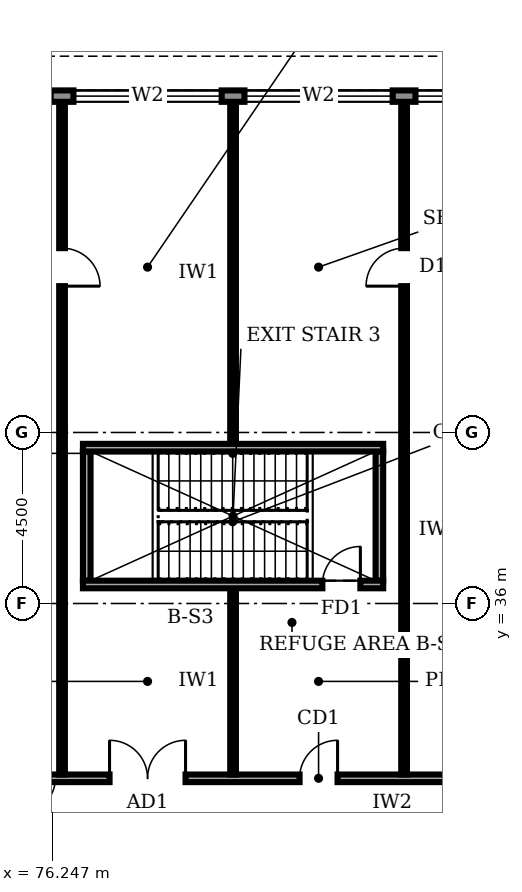
"""IFC4 building model, lengths in metres.
Left out: names, types, materials, properties, quantities, classifications, styles, units other than length and angle.
Written with IfcOpenShell. Run it as: python <this file> out.ifc"""

import sys

from ifc_helpers import new_model, si_unit, direction, frame, frame_2d, origin, place, context, subcontext, project, spatial, rectangle, extrude, element, fill, save


model = new_model("IFC4")
c1 = context("Model", 3, precision=1e-05, world=origin(), true_north=direction((0.0, 1.0)))
c2 = subcontext(c1, "Body", "Model", "MODEL_VIEW")
j1 = project(units=[si_unit("LENGTHUNIT", "METRE"), si_unit("PLANEANGLEUNIT", "RADIAN")], contexts=[c1])
p1 = place(None, origin())
s1 = spatial("IfcSite", under=j1, at=p1, CompositionType="ELEMENT")
p2 = place(p1, origin())
s2 = spatial("IfcBuilding", under=s1, at=p2, CompositionType="ELEMENT")
p3 = place(p2, frame((0.0, 0.0, 6.0)))
s3 = spatial("IfcBuildingStorey", under=s2, at=p3, CompositionType="ELEMENT", Elevation=6.0)
p4 = place(p3, frame((98.98, 49.35, 0.0), z_axis=(0.0, 0.0, 1.0), x_axis=(-1.0, 0.0, 0.0)))
e1 = element("IfcWall", 1, at=p4, inside=s3, PredefinedType="STANDARD", context=c2, shape_type="SweptSolid", body=[
    extrude(rectangle(XDim=98.96, YDim=0.3, at=frame_2d((49.48, 0.0))), origin(), (0.0, 0.0, 1.0), 4.7),
])
p5 = place(p4, frame((94.78, 0.0, 0.6)))
e2 = element("IfcOpeningElement", 2, at=p5, cuts=e1, PredefinedType="OPENING", context=c2, shape_type="SweptSolid", body=[
    extrude(rectangle(XDim=3.9, YDim=2.6, at=frame_2d((1.95, 1.3))), frame((0.0, 0.16, 0.0), z_axis=(0.0, -1.0, 0.0), x_axis=(1.0, 0.0, 0.0)), (0.0, 0.0, 1.0), 0.32),
])
p6 = place(p4, frame((90.28, 0.0, 0.6)))
e3 = element("IfcOpeningElement", 3, at=p6, cuts=e1, PredefinedType="OPENING", context=c2, shape_type="SweptSolid", body=[
    extrude(rectangle(XDim=3.9, YDim=2.6, at=frame_2d((1.95, 1.3))), frame((0.0, 0.16, 0.0), z_axis=(0.0, -1.0, 0.0), x_axis=(1.0, 0.0, 0.0)), (0.0, 0.0, 1.0), 0.32),
])
p7 = place(p4, frame((85.78, 0.0, 0.6)))
e4 = element("IfcOpeningElement", 4, at=p7, cuts=e1, PredefinedType="OPENING", context=c2, shape_type="SweptSolid", body=[
    extrude(rectangle(XDim=3.9, YDim=2.6, at=frame_2d((1.95, 1.3))), frame((0.0, 0.16, 0.0), z_axis=(0.0, -1.0, 0.0), x_axis=(1.0, 0.0, 0.0)), (0.0, 0.0, 1.0), 0.32),
])
p8 = place(p4, frame((81.28, 0.0, 0.6)))
e5 = element("IfcOpeningElement", 5, at=p8, cuts=e1, PredefinedType="OPENING", context=c2, shape_type="SweptSolid", body=[
    extrude(rectangle(XDim=3.9, YDim=2.6, at=frame_2d((1.95, 1.3))), frame((0.0, 0.16, 0.0), z_axis=(0.0, -1.0, 0.0), x_axis=(1.0, 0.0, 0.0)), (0.0, 0.0, 1.0), 0.32),
])
p9 = place(p4, frame((76.78, 0.0, 0.6)))
e6 = element("IfcOpeningElement", 6, at=p9, cuts=e1, PredefinedType="OPENING", context=c2, shape_type="SweptSolid", body=[
    extrude(rectangle(XDim=3.9, YDim=2.6, at=frame_2d((1.95, 1.3))), frame((0.0, 0.16, 0.0), z_axis=(0.0, -1.0, 0.0), x_axis=(1.0, 0.0, 0.0)), (0.0, 0.0, 1.0), 0.32),
])
p10 = place(p4, frame((72.28, 0.0, 0.6)))
e7 = element("IfcOpeningElement", 7, at=p10, cuts=e1, PredefinedType="OPENING", context=c2, shape_type="SweptSolid", body=[
    extrude(rectangle(XDim=3.9, YDim=2.6, at=frame_2d((1.95, 1.3))), frame((0.0, 0.16, 0.0), z_axis=(0.0, -1.0, 0.0), x_axis=(1.0, 0.0, 0.0)), (0.0, 0.0, 1.0), 0.32),
])
p11 = place(p4, frame((67.78, 0.0, 0.6)))
e8 = element("IfcOpeningElement", 8, at=p11, cuts=e1, PredefinedType="OPENING", context=c2, shape_type="SweptSolid", body=[
    extrude(rectangle(XDim=3.9, YDim=2.6, at=frame_2d((1.95, 1.3))), frame((0.0, 0.16, 0.0), z_axis=(0.0, -1.0, 0.0), x_axis=(1.0, 0.0, 0.0)), (0.0, 0.0, 1.0), 0.32),
])
p12 = place(p4, frame((63.28, 0.0, 0.6)))
e9 = element("IfcOpeningElement", 9, at=p12, cuts=e1, PredefinedType="OPENING", context=c2, shape_type="SweptSolid", body=[
    extrude(rectangle(XDim=3.9, YDim=2.6, at=frame_2d((1.95, 1.3))), frame((0.0, 0.16, 0.0), z_axis=(0.0, -1.0, 0.0), x_axis=(1.0, 0.0, 0.0)), (0.0, 0.0, 1.0), 0.32),
])
p13 = place(p4, frame((58.78, 0.0, 0.6)))
e10 = element("IfcOpeningElement", 10, at=p13, cuts=e1, PredefinedType="OPENING", context=c2, shape_type="SweptSolid", body=[
    extrude(rectangle(XDim=3.9, YDim=2.6, at=frame_2d((1.95, 1.3))), frame((0.0, 0.16, 0.0), z_axis=(0.0, -1.0, 0.0), x_axis=(1.0, 0.0, 0.0)), (0.0, 0.0, 1.0), 0.32),
])
p14 = place(p4, frame((54.28, 0.0, 0.6)))
e11 = element("IfcOpeningElement", 11, at=p14, cuts=e1, PredefinedType="OPENING", context=c2, shape_type="SweptSolid", body=[
    extrude(rectangle(XDim=3.9, YDim=2.6, at=frame_2d((1.95, 1.3))), frame((0.0, 0.16, 0.0), z_axis=(0.0, -1.0, 0.0), x_axis=(1.0, 0.0, 0.0)), (0.0, 0.0, 1.0), 0.32),
])
p15 = place(p4, frame((49.78, 0.0, 0.6)))
e12 = element("IfcOpeningElement", 12, at=p15, cuts=e1, PredefinedType="OPENING", context=c2, shape_type="SweptSolid", body=[
    extrude(rectangle(XDim=3.9, YDim=2.6, at=frame_2d((1.95, 1.3))), frame((0.0, 0.16, 0.0), z_axis=(0.0, -1.0, 0.0), x_axis=(1.0, 0.0, 0.0)), (0.0, 0.0, 1.0), 0.32),
])
p16 = place(p4, frame((45.28, 0.0, 0.6)))
e13 = element("IfcOpeningElement", 13, at=p16, cuts=e1, PredefinedType="OPENING", context=c2, shape_type="SweptSolid", body=[
    extrude(rectangle(XDim=3.9, YDim=2.6, at=frame_2d((1.95, 1.3))), frame((0.0, 0.16, 0.0), z_axis=(0.0, -1.0, 0.0), x_axis=(1.0, 0.0, 0.0)), (0.0, 0.0, 1.0), 0.32),
])
p17 = place(p4, frame((40.78, 0.0, 0.6)))
e14 = element("IfcOpeningElement", 14, at=p17, cuts=e1, PredefinedType="OPENING", context=c2, shape_type="SweptSolid", body=[
    extrude(rectangle(XDim=3.9, YDim=2.6, at=frame_2d((1.95, 1.3))), frame((0.0, 0.16, 0.0), z_axis=(0.0, -1.0, 0.0), x_axis=(1.0, 0.0, 0.0)), (0.0, 0.0, 1.0), 0.32),
])
p18 = place(p4, frame((36.28, 0.0, 0.6)))
e15 = element("IfcOpeningElement", 15, at=p18, cuts=e1, PredefinedType="OPENING", context=c2, shape_type="SweptSolid", body=[
    extrude(rectangle(XDim=3.9, YDim=2.6, at=frame_2d((1.95, 1.3))), frame((0.0, 0.16, 0.0), z_axis=(0.0, -1.0, 0.0), x_axis=(1.0, 0.0, 0.0)), (0.0, 0.0, 1.0), 0.32),
])
p19 = place(p4, frame((31.78, 0.0, 0.6)))
e16 = element("IfcOpeningElement", 16, at=p19, cuts=e1, PredefinedType="OPENING", context=c2, shape_type="SweptSolid", body=[
    extrude(rectangle(XDim=3.9, YDim=2.6, at=frame_2d((1.95, 1.3))), frame((0.0, 0.16, 0.0), z_axis=(0.0, -1.0, 0.0), x_axis=(1.0, 0.0, 0.0)), (0.0, 0.0, 1.0), 0.32),
])
p20 = place(p4, frame((27.28, 0.0, 0.6)))
e17 = element("IfcOpeningElement", 17, at=p20, cuts=e1, PredefinedType="OPENING", context=c2, shape_type="SweptSolid", body=[
    extrude(rectangle(XDim=3.9, YDim=2.6, at=frame_2d((1.95, 1.3))), frame((0.0, 0.16, 0.0), z_axis=(0.0, -1.0, 0.0), x_axis=(1.0, 0.0, 0.0)), (0.0, 0.0, 1.0), 0.32),
])
p21 = place(p4, frame((22.78, 0.0, 0.6)))
e18 = element("IfcOpeningElement", 18, at=p21, cuts=e1, PredefinedType="OPENING", context=c2, shape_type="SweptSolid", body=[
    extrude(rectangle(XDim=3.9, YDim=2.6, at=frame_2d((1.95, 1.3))), frame((0.0, 0.16, 0.0), z_axis=(0.0, -1.0, 0.0), x_axis=(1.0, 0.0, 0.0)), (0.0, 0.0, 1.0), 0.32),
])
p22 = place(p4, frame((18.28, 0.0, 0.6)))
e19 = element("IfcOpeningElement", 19, at=p22, cuts=e1, PredefinedType="OPENING", context=c2, shape_type="SweptSolid", body=[
    extrude(rectangle(XDim=3.9, YDim=2.6, at=frame_2d((1.95, 1.3))), frame((0.0, 0.16, 0.0), z_axis=(0.0, -1.0, 0.0), x_axis=(1.0, 0.0, 0.0)), (0.0, 0.0, 1.0), 0.32),
])
p23 = place(p4, frame((13.78, 0.0, 0.6)))
e20 = element("IfcOpeningElement", 20, at=p23, cuts=e1, PredefinedType="OPENING", context=c2, shape_type="SweptSolid", body=[
    extrude(rectangle(XDim=3.9, YDim=2.6, at=frame_2d((1.95, 1.3))), frame((0.0, 0.16, 0.0), z_axis=(0.0, -1.0, 0.0), x_axis=(1.0, 0.0, 0.0)), (0.0, 0.0, 1.0), 0.32),
])
p24 = place(p4, frame((9.28, 0.0, 0.6)))
e21 = element("IfcOpeningElement", 21, at=p24, cuts=e1, PredefinedType="OPENING", context=c2, shape_type="SweptSolid", body=[
    extrude(rectangle(XDim=3.9, YDim=2.6, at=frame_2d((1.95, 1.3))), frame((0.0, 0.16, 0.0), z_axis=(0.0, -1.0, 0.0), x_axis=(1.0, 0.0, 0.0)), (0.0, 0.0, 1.0), 0.32),
])
p25 = place(p4, frame((4.78, 0.0, 0.6)))
e22 = element("IfcOpeningElement", 22, at=p25, cuts=e1, PredefinedType="OPENING", context=c2, shape_type="SweptSolid", body=[
    extrude(rectangle(XDim=3.9, YDim=2.6, at=frame_2d((1.95, 1.3))), frame((0.0, 0.16, 0.0), z_axis=(0.0, -1.0, 0.0), x_axis=(1.0, 0.0, 0.0)), (0.0, 0.0, 1.0), 0.32),
])
p26 = place(p3, frame((89.35, 31.4, 0.0), z_axis=(0.0, 0.0, 1.0), x_axis=(-1.0, 0.0, 0.0)))
e23 = element("IfcWall", 23, at=p26, inside=s3, PredefinedType="SOLIDWALL", context=c2, shape_type="SweptSolid", body=[
    extrude(rectangle(XDim=16.9, YDim=0.2, at=frame_2d((8.45, 0.0))), origin(), (0.0, 0.0, 1.0), 4.7),
])
p27 = place(p26, frame((13.925, 0.0, 0.0)))
e24 = element("IfcOpeningElement", 24, at=p27, cuts=e23, PredefinedType="OPENING", context=c2, shape_type="SweptSolid", body=[
    extrude(rectangle(XDim=1.8, YDim=2.1, at=frame_2d((0.9, 1.05))), frame((0.0, 0.11, 0.0), z_axis=(0.0, -1.0, 0.0), x_axis=(1.0, 0.0, 0.0)), (0.0, 0.0, 1.0), 0.22),
])
p28 = place(p26, frame((9.6, 0.0, 0.0)))
e25 = element("IfcOpeningElement", 25, at=p28, cuts=e23, PredefinedType="OPENING", context=c2, shape_type="SweptSolid", body=[
    extrude(rectangle(XDim=2.0, YDim=2.4, at=frame_2d((1.0, 1.2))), frame((0.0, 0.11, 0.0), z_axis=(0.0, -1.0, 0.0), x_axis=(1.0, 0.0, 0.0)), (0.0, 0.0, 1.0), 0.22),
])
p29 = place(p26, frame((5.6, 0.0, 0.0)))
e26 = element("IfcOpeningElement", 26, at=p29, cuts=e23, PredefinedType="OPENING", context=c2, shape_type="SweptSolid", body=[
    extrude(rectangle(XDim=1.0, YDim=2.1, at=frame_2d((0.5, 1.05))), frame((0.0, 0.11, 0.0), z_axis=(0.0, -1.0, 0.0), x_axis=(1.0, 0.0, 0.0)), (0.0, 0.0, 1.0), 0.22),
])
p30 = place(p26, frame((0.925, 0.0, 0.0)))
e27 = element("IfcOpeningElement", 27, at=p30, cuts=e23, PredefinedType="OPENING", context=c2, shape_type="SweptSolid", body=[
    extrude(rectangle(XDim=1.8, YDim=2.1, at=frame_2d((0.9, 1.05))), frame((0.0, 0.11, 0.0), z_axis=(0.0, -1.0, 0.0), x_axis=(1.0, 0.0, 0.0)), (0.0, 0.0, 1.0), 0.22),
])
p31 = place(p3, frame((76.5, 31.5, 0.0), z_axis=(0.0, 0.0, 1.0), x_axis=(0.0, 1.0, 0.0)))
e28 = element("IfcWall", 28, at=p31, inside=s3, PredefinedType="PARTITIONING", context=c2, shape_type="SweptSolid", body=[
    extrude(rectangle(XDim=17.7, YDim=0.15, at=frame_2d((8.85, 0.0))), origin(), (0.0, 0.0, 1.0), 4.7),
])
p32 = place(p31, frame((12.85, 0.0, 0.0)))
e29 = element("IfcOpeningElement", 29, at=p32, cuts=e28, PredefinedType="OPENING", context=c2, shape_type="SweptSolid", body=[
    extrude(rectangle(XDim=1.0, YDim=2.1, at=frame_2d((0.5, 1.05))), frame((0.0, 0.085, 0.0), z_axis=(0.0, -1.0, 0.0), x_axis=(1.0, 0.0, 0.0)), (0.0, 0.0, 1.0), 0.17),
])
p33 = place(p3, frame((81.0, 31.5, 0.0), z_axis=(0.0, 0.0, 1.0), x_axis=(0.0, 1.0, 0.0)))
e30 = element("IfcWall", 30, at=p33, inside=s3, PredefinedType="PARTITIONING", context=c2, shape_type="SweptSolid", body=[
    extrude(rectangle(XDim=4.9, YDim=0.15, at=frame_2d((2.45, 0.0))), origin(), (0.0, 0.0, 1.0), 4.7),
])
p34 = place(p3, frame((81.0, 40.2, 0.0), z_axis=(0.0, 0.0, 1.0), x_axis=(0.0, 1.0, 0.0)))
e31 = element("IfcWall", 31, at=p34, inside=s3, PredefinedType="PARTITIONING", context=c2, shape_type="SweptSolid", body=[
    extrude(rectangle(XDim=9.0, YDim=0.15, at=frame_2d((4.5, 0.0))), origin(), (0.0, 0.0, 1.0), 4.7),
])
p35 = place(p3, frame((85.5, 31.5, 0.0), z_axis=(0.0, 0.0, 1.0), x_axis=(0.0, 1.0, 0.0)))
e32 = element("IfcWall", 32, at=p35, inside=s3, PredefinedType="PARTITIONING", context=c2, shape_type="SweptSolid", body=[
    extrude(rectangle(XDim=17.7, YDim=0.15, at=frame_2d((8.85, 0.0))), origin(), (0.0, 0.0, 1.0), 4.7),
])
p36 = place(p35, frame((12.85, 0.0, 0.0)))
e33 = element("IfcOpeningElement", 33, at=p36, cuts=e32, PredefinedType="OPENING", context=c2, shape_type="SweptSolid", body=[
    extrude(rectangle(XDim=1.0, YDim=2.1, at=frame_2d((0.5, 1.05))), frame((0.0, 0.085, 0.0), z_axis=(0.0, -1.0, 0.0), x_axis=(1.0, 0.0, 0.0)), (0.0, 0.0, 1.0), 0.17),
])
p37 = place(p3, frame((77.05, 36.5, 0.0), z_axis=(0.0, 0.0, 1.0), x_axis=(1.0, 0.0, 0.0)))
e34 = element("IfcWall", 34, at=p37, inside=s3, PredefinedType="SOLIDWALL", context=c2, shape_type="SweptSolid", body=[
    extrude(rectangle(XDim=7.9, YDim=0.2, at=frame_2d((3.95, 0.0))), origin(), (0.0, 0.0, 1.0), 4.7),
])
p38 = place(p37, frame((6.3, 0.0, 0.0)))
e35 = element("IfcOpeningElement", 35, at=p38, cuts=e34, PredefinedType="OPENING", context=c2, shape_type="SweptSolid", body=[
    extrude(rectangle(XDim=1.0, YDim=2.1, at=frame_2d((0.5, 1.05))), frame((0.0, 0.11, 0.0), z_axis=(0.0, -1.0, 0.0), x_axis=(1.0, 0.0, 0.0)), (0.0, 0.0, 1.0), 0.22),
])
p39 = place(p3, frame((77.05, 40.1, 0.0), z_axis=(0.0, 0.0, 1.0), x_axis=(1.0, 0.0, 0.0)))
e36 = element("IfcWall", 36, at=p39, inside=s3, PredefinedType="SOLIDWALL", context=c2, shape_type="SweptSolid", body=[
    extrude(rectangle(XDim=7.9, YDim=0.2, at=frame_2d((3.95, 0.0))), origin(), (0.0, 0.0, 1.0), 4.7),
])
for number, where, z_axis, x_axis in (
    (37, (77.15, 36.6, 0.0), (0.0, 0.0, 1.0), (0.0, 1.0, 0.0)),
    (38, (84.85, 36.6, 0.0), (0.0, 0.0, 1.0), (0.0, 1.0, 0.0)),
):
    element("IfcWall", number, at=place(p3, frame(where, z_axis=z_axis, x_axis=x_axis)), inside=s3, PredefinedType="SOLIDWALL", context=c2, shape_type="SweptSolid", body=[
        extrude(rectangle(XDim=3.4, YDim=0.2, at=frame_2d((1.7, 0.0))), origin(), (0.0, 0.0, 1.0), 4.7),
    ])
p40 = place(p22, origin())
e39 = element("IfcWindow", 39, at=p40, inside=s3, PartitioningType="SINGLE_PANEL", PredefinedType="WINDOW", context=c2, shape_type="SweptSolid", body=[
    extrude(rectangle(XDim=3.9, YDim=2.6, at=frame_2d((1.95, 1.3))), frame((0.0, 0.03, 0.0), z_axis=(0.0, -1.0, 0.0), x_axis=(1.0, 0.0, 0.0)), (0.0, 0.0, 1.0), 0.06),
])
fill(e19, e39)
p41 = place(p23, origin())
e40 = element("IfcWindow", 40, at=p41, inside=s3, PartitioningType="SINGLE_PANEL", PredefinedType="WINDOW", context=c2, shape_type="SweptSolid", body=[
    extrude(rectangle(XDim=3.9, YDim=2.6, at=frame_2d((1.95, 1.3))), frame((0.0, 0.03, 0.0), z_axis=(0.0, -1.0, 0.0), x_axis=(1.0, 0.0, 0.0)), (0.0, 0.0, 1.0), 0.06),
])
fill(e20, e40)
p42 = place(p24, origin())
e41 = element("IfcWindow", 41, at=p42, inside=s3, PartitioningType="SINGLE_PANEL", PredefinedType="WINDOW", context=c2, shape_type="SweptSolid", body=[
    extrude(rectangle(XDim=3.9, YDim=2.6, at=frame_2d((1.95, 1.3))), frame((0.0, 0.03, 0.0), z_axis=(0.0, -1.0, 0.0), x_axis=(1.0, 0.0, 0.0)), (0.0, 0.0, 1.0), 0.06),
])
fill(e21, e41)
p43 = place(p28, frame((2.0, 0.0, 0.0), z_axis=(0.0, 0.0, 1.0), x_axis=(-1.0, 0.0, 0.0)))
e42 = element("IfcDoor", 42, at=p43, inside=s3, OperationType="DOUBLE_DOOR_SINGLE_SWING", PredefinedType="DOOR", context=c2, shape_type="SweptSolid", body=[
    extrude(rectangle(XDim=2.0, YDim=2.4, at=frame_2d((1.0, 1.2))), frame((0.0, 0.025, 0.0), z_axis=(0.0, -1.0, 0.0), x_axis=(1.0, 0.0, 0.0)), (0.0, 0.0, 1.0), 0.05),
])
fill(e25, e42)
p44 = place(p29, frame((1.0, 0.0, 0.0), z_axis=(0.0, 0.0, 1.0), x_axis=(-1.0, 0.0, 0.0)))
e43 = element("IfcDoor", 43, at=p44, inside=s3, OperationType="SINGLE_SWING_RIGHT", PredefinedType="DOOR", context=c2, shape_type="SweptSolid", body=[
    extrude(rectangle(XDim=1.0, YDim=2.1, at=frame_2d((0.5, 1.05))), frame((0.0, 0.025, 0.0), z_axis=(0.0, -1.0, 0.0), x_axis=(1.0, 0.0, 0.0)), (0.0, 0.0, 1.0), 0.05),
])
fill(e26, e43)
p45 = place(p32, frame((1.0, 0.0, 0.0), z_axis=(0.0, 0.0, 1.0), x_axis=(-1.0, 0.0, 0.0)))
e44 = element("IfcDoor", 44, at=p45, inside=s3, OperationType="SINGLE_SWING_RIGHT", PredefinedType="DOOR", context=c2, shape_type="SweptSolid", body=[
    extrude(rectangle(XDim=1.0, YDim=2.1, at=frame_2d((0.5, 1.05))), frame((0.0, 0.025, 0.0), z_axis=(0.0, -1.0, 0.0), x_axis=(1.0, 0.0, 0.0)), (0.0, 0.0, 1.0), 0.05),
])
fill(e29, e44)
p46 = place(p36, origin())
e45 = element("IfcDoor", 45, at=p46, inside=s3, OperationType="SINGLE_SWING_LEFT", PredefinedType="DOOR", context=c2, shape_type="SweptSolid", body=[
    extrude(rectangle(XDim=1.0, YDim=2.1, at=frame_2d((0.5, 1.05))), frame((0.0, 0.025, 0.0), z_axis=(0.0, -1.0, 0.0), x_axis=(1.0, 0.0, 0.0)), (0.0, 0.0, 1.0), 0.05),
])
fill(e33, e45)
p47 = place(p38, origin())
e46 = element("IfcDoor", 46, at=p47, inside=s3, OperationType="SINGLE_SWING_RIGHT", PredefinedType="DOOR", context=c2, shape_type="SweptSolid", body=[
    extrude(rectangle(XDim=1.0, YDim=2.1, at=frame_2d((0.5, 1.05))), frame((0.0, 0.025, 0.0), z_axis=(0.0, -1.0, 0.0), x_axis=(1.0, 0.0, 0.0)), (0.0, 0.0, 1.0), 0.05),
])
fill(e35, e46)
save(model, sys.argv[1])
